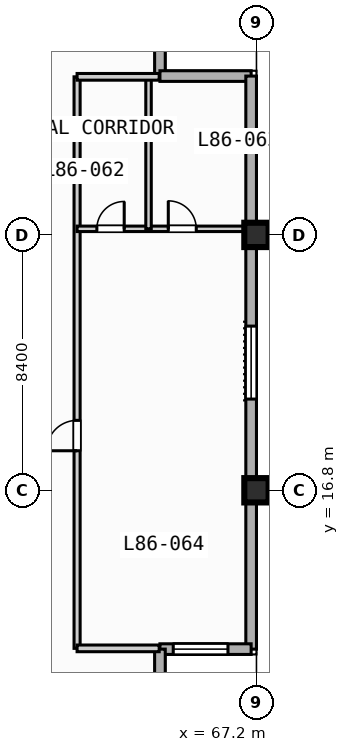
"""IFC4 building model, lengths in metres.
Left out: names, types, materials, properties, quantities, classifications, styles, units other than length and angle.
Written with IfcOpenShell. Run it as: python <this file> out.ifc"""

import sys

from ifc_helpers import new_model, si_unit, direction, frame, frame_2d, origin, origin_2d, place, context, subcontext, project, spatial, rectangle, extrude, element, fill, save


model = new_model("IFC4")
c1 = context("Model", 3, precision=1e-05, world=origin(), true_north=direction((0.0, 1.0)))
c2 = subcontext(c1, "Body", "Model", "MODEL_VIEW")
j1 = project(units=[si_unit("LENGTHUNIT", "METRE"), si_unit("PLANEANGLEUNIT", "RADIAN")], contexts=[c1])
p1 = place(None, origin())
s1 = spatial("IfcSite", under=j1, at=p1, CompositionType="ELEMENT")
p2 = place(p1, origin())
s2 = spatial("IfcBuilding", under=s1, at=p2, CompositionType="ELEMENT")
p3 = place(p2, frame((0.0, 0.0, 347.6)))
s3 = spatial("IfcBuildingStorey", under=s2, at=p3, CompositionType="ELEMENT", Elevation=347.6)
for number, where, z_axis, x_axis in (
    (1, (67.2, 16.8, 0.0), (0.0, 0.0, 1.0), (1.0, 0.0, 0.0)),
    (2, (67.2, 25.2, 0.0), (0.0, 0.0, 1.0), (1.0, 0.0, 0.0)),
):
    element("IfcColumn", number, at=place(p3, frame(where, z_axis=z_axis, x_axis=x_axis)), inside=s3, PredefinedType="COLUMN", context=c2, shape_type="SweptSolid", body=[
        extrude(rectangle(XDim=0.8, YDim=0.8, at=origin_2d()), origin(), (0.0, 0.0, 1.0), 3.9),
    ])
for number, where, z_axis, x_axis in (
    (3, (64.025, 33.425, 0.0), (0.0, 0.0, 1.0), (0.0, -1.0, 0.0)),
    (4, (64.025, 30.425, 0.0), (0.0, 0.0, 1.0), (1.0, 0.0, 0.0)),
):
    element("IfcWall", number, at=place(p3, frame(where, z_axis=z_axis, x_axis=x_axis)), inside=s3, PredefinedType="STANDARD", context=c2, shape_type="SweptSolid", body=[
        extrude(rectangle(XDim=3.0, YDim=0.35, at=frame_2d((1.5, 0.0))), origin(), (0.0, 0.0, 1.0), 3.67),
    ])
p4 = place(p3, frame((67.025, 30.425, 0.0), z_axis=(0.0, 0.0, 1.0), x_axis=(0.0, -1.0, 0.0)))
e5 = element("IfcWall", 5, at=p4, inside=s3, PredefinedType="STANDARD", context=c2, shape_type="SweptSolid", body=[
    extrude(rectangle(XDim=18.85, YDim=0.35, at=frame_2d((9.425, 0.0))), origin(), (0.0, 0.0, 1.0), 3.67),
])
p5 = place(p4, frame((8.225, 0.0, 0.85)))
e6 = element("IfcOpeningElement", 6, at=p5, cuts=e5, PredefinedType="OPENING", context=c2, shape_type="SweptSolid", body=[
    extrude(rectangle(XDim=2.4, YDim=1.95, at=frame_2d((1.2, 0.975))), frame((0.0, 0.185, 0.0), z_axis=(0.0, -1.0, 0.0), x_axis=(1.0, 0.0, 0.0)), (0.0, 0.0, 1.0), 0.37),
])
p6 = place(p3, frame((67.025, 11.575, 0.0), z_axis=(0.0, 0.0, 1.0), x_axis=(-1.0, 0.0, 0.0)))
e7 = element("IfcWall", 7, at=p6, inside=s3, PredefinedType="STANDARD", context=c2, shape_type="SweptSolid", body=[
    extrude(rectangle(XDim=3.0, YDim=0.35, at=frame_2d((1.5, 0.0))), origin(), (0.0, 0.0, 1.0), 3.67),
])
p7 = place(p6, frame((0.762, 0.0, 0.85)))
e8 = element("IfcOpeningElement", 8, at=p7, cuts=e7, PredefinedType="OPENING", context=c2, shape_type="SweptSolid", body=[
    extrude(rectangle(XDim=1.8, YDim=1.8, at=frame_2d((0.9, 0.9))), frame((0.0, 0.185, 0.0), z_axis=(0.0, -1.0, 0.0), x_axis=(1.0, 0.0, 0.0)), (0.0, 0.0, 1.0), 0.37),
])
p8 = place(p3, frame((64.025, 11.575, 0.0), z_axis=(0.0, 0.0, 1.0), x_axis=(0.0, -1.0, 0.0)))
e9 = element("IfcWall", 9, at=p8, inside=s3, PredefinedType="STANDARD", context=c2, shape_type="SweptSolid", body=[
    extrude(rectangle(XDim=3.0, YDim=0.35, at=frame_2d((1.5, 0.0))), origin(), (0.0, 0.0, 1.0), 3.67),
])
p9 = place(p3, frame((61.3, 11.6, 0.0), z_axis=(0.0, 0.0, 1.0), x_axis=(0.0, 1.0, 0.0)))
e10 = element("IfcWall", 10, at=p9, inside=s3, PredefinedType="PARTITIONING", context=c2, shape_type="SweptSolid", body=[
    extrude(rectangle(XDim=18.8, YDim=0.2, at=frame_2d((9.4, 0.0))), origin(), (0.0, 0.0, 1.0), 3.67),
])
p10 = place(p9, frame((6.5, 0.0, 0.0)))
e11 = element("IfcOpeningElement", 11, at=p10, cuts=e10, PredefinedType="OPENING", context=c2, shape_type="SweptSolid", body=[
    extrude(rectangle(XDim=1.0, YDim=2.15, at=frame_2d((0.5, 1.075))), frame((0.0, 0.11, 0.0), z_axis=(0.0, -1.0, 0.0), x_axis=(1.0, 0.0, 0.0)), (0.0, 0.0, 1.0), 0.22),
])
p11 = place(p3, frame((61.3, 25.4, 0.0), z_axis=(0.0, 0.0, 1.0), x_axis=(1.0, 0.0, 0.0)))
e12 = element("IfcWall", 12, at=p11, inside=s3, PredefinedType="PLUMBINGWALL", context=c2, shape_type="SweptSolid", body=[
    extrude(rectangle(XDim=5.5, YDim=0.18, at=frame_2d((2.75, 0.0))), origin(), (0.0, 0.0, 1.0), 3.07),
])
p12 = place(p11, frame((0.65, 0.0, 0.0)))
e13 = element("IfcOpeningElement", 13, at=p12, cuts=e12, PredefinedType="OPENING", context=c2, shape_type="SweptSolid", body=[
    extrude(rectangle(XDim=0.9, YDim=2.1, at=frame_2d((0.45, 1.05))), frame((0.0, 0.1, 0.0), z_axis=(0.0, -1.0, 0.0), x_axis=(1.0, 0.0, 0.0)), (0.0, 0.0, 1.0), 0.2),
])
p13 = place(p11, frame((3.0, 0.0, 0.0)))
e14 = element("IfcOpeningElement", 14, at=p13, cuts=e12, PredefinedType="OPENING", context=c2, shape_type="SweptSolid", body=[
    extrude(rectangle(XDim=0.92, YDim=2.1, at=frame_2d((0.46, 1.05))), frame((0.0, 0.1, 0.0), z_axis=(0.0, -1.0, 0.0), x_axis=(1.0, 0.0, 0.0)), (0.0, 0.0, 1.0), 0.2),
])
p14 = place(p3, frame((63.65, 25.4, 0.0), z_axis=(0.0, 0.0, 1.0), x_axis=(0.0, 1.0, 0.0)))
e15 = element("IfcWall", 15, at=p14, inside=s3, PredefinedType="PLUMBINGWALL", context=c2, shape_type="SweptSolid", body=[
    extrude(rectangle(XDim=5.0, YDim=0.18, at=frame_2d((2.5, 0.0))), origin(), (0.0, 0.0, 1.0), 3.67),
])
for number, where, z_axis, x_axis in (
    (16, (61.3, 11.6, 0.0), (0.0, 0.0, 1.0), (1.0, 0.0, 0.0)),
    (17, (61.3, 30.4, 0.0), (0.0, 0.0, 1.0), (1.0, 0.0, 0.0)),
):
    element("IfcWall", number, at=place(p3, frame(where, z_axis=z_axis, x_axis=x_axis)), inside=s3, PredefinedType="PARTITIONING", context=c2, shape_type="SweptSolid", body=[
        extrude(rectangle(XDim=2.7, YDim=0.22, at=frame_2d((1.35, 0.0))), origin(), (0.0, 0.0, 1.0), 3.67),
    ])
p15 = place(p5, origin())
e18 = element("IfcWindow", 18, at=p15, inside=s3, PartitioningType="SINGLE_PANEL", PredefinedType="WINDOW", context=c2, shape_type="SweptSolid", body=[
    extrude(rectangle(XDim=2.4, YDim=1.95, at=frame_2d((1.2, 0.975))), frame((0.0, 0.03, 0.0), z_axis=(0.0, -1.0, 0.0), x_axis=(1.0, 0.0, 0.0)), (0.0, 0.0, 1.0), 0.06),
])
fill(e6, e18)
p16 = place(p7, origin())
e19 = element("IfcWindow", 19, at=p16, inside=s3, PartitioningType="SINGLE_PANEL", PredefinedType="WINDOW", context=c2, shape_type="SweptSolid", body=[
    extrude(rectangle(XDim=1.8, YDim=1.8, at=frame_2d((0.9, 0.9))), frame((0.0, 0.03, 0.0), z_axis=(0.0, -1.0, 0.0), x_axis=(1.0, 0.0, 0.0)), (0.0, 0.0, 1.0), 0.06),
])
fill(e8, e19)
p17 = place(p10, origin())
e20 = element("IfcDoor", 20, at=p17, inside=s3, OperationType="SINGLE_SWING_LEFT", PredefinedType="DOOR", context=c2, shape_type="SweptSolid", body=[
    extrude(rectangle(XDim=1.0, YDim=2.15, at=frame_2d((0.5, 1.075))), frame((0.0, 0.025, 0.0), z_axis=(0.0, -1.0, 0.0), x_axis=(1.0, 0.0, 0.0)), (0.0, 0.0, 1.0), 0.05),
])
fill(e11, e20)
p18 = place(p12, origin())
e21 = element("IfcDoor", 21, at=p18, inside=s3, OperationType="SINGLE_SWING_RIGHT", PredefinedType="DOOR", context=c2, shape_type="SweptSolid", body=[
    extrude(rectangle(XDim=0.9, YDim=2.1, at=frame_2d((0.45, 1.05))), frame((0.0, 0.025, 0.0), z_axis=(0.0, -1.0, 0.0), x_axis=(1.0, 0.0, 0.0)), (0.0, 0.0, 1.0), 0.05),
])
fill(e13, e21)
p19 = place(p13, origin())
e22 = element("IfcDoor", 22, at=p19, inside=s3, OperationType="SINGLE_SWING_LEFT", PredefinedType="DOOR", context=c2, shape_type="SweptSolid", body=[
    extrude(rectangle(XDim=0.92, YDim=2.1, at=frame_2d((0.46, 1.05))), frame((0.0, 0.025, 0.0), z_axis=(0.0, -1.0, 0.0), x_axis=(1.0, 0.0, 0.0)), (0.0, 0.0, 1.0), 0.05),
])
fill(e14, e22)
save(model, sys.argv[1])
